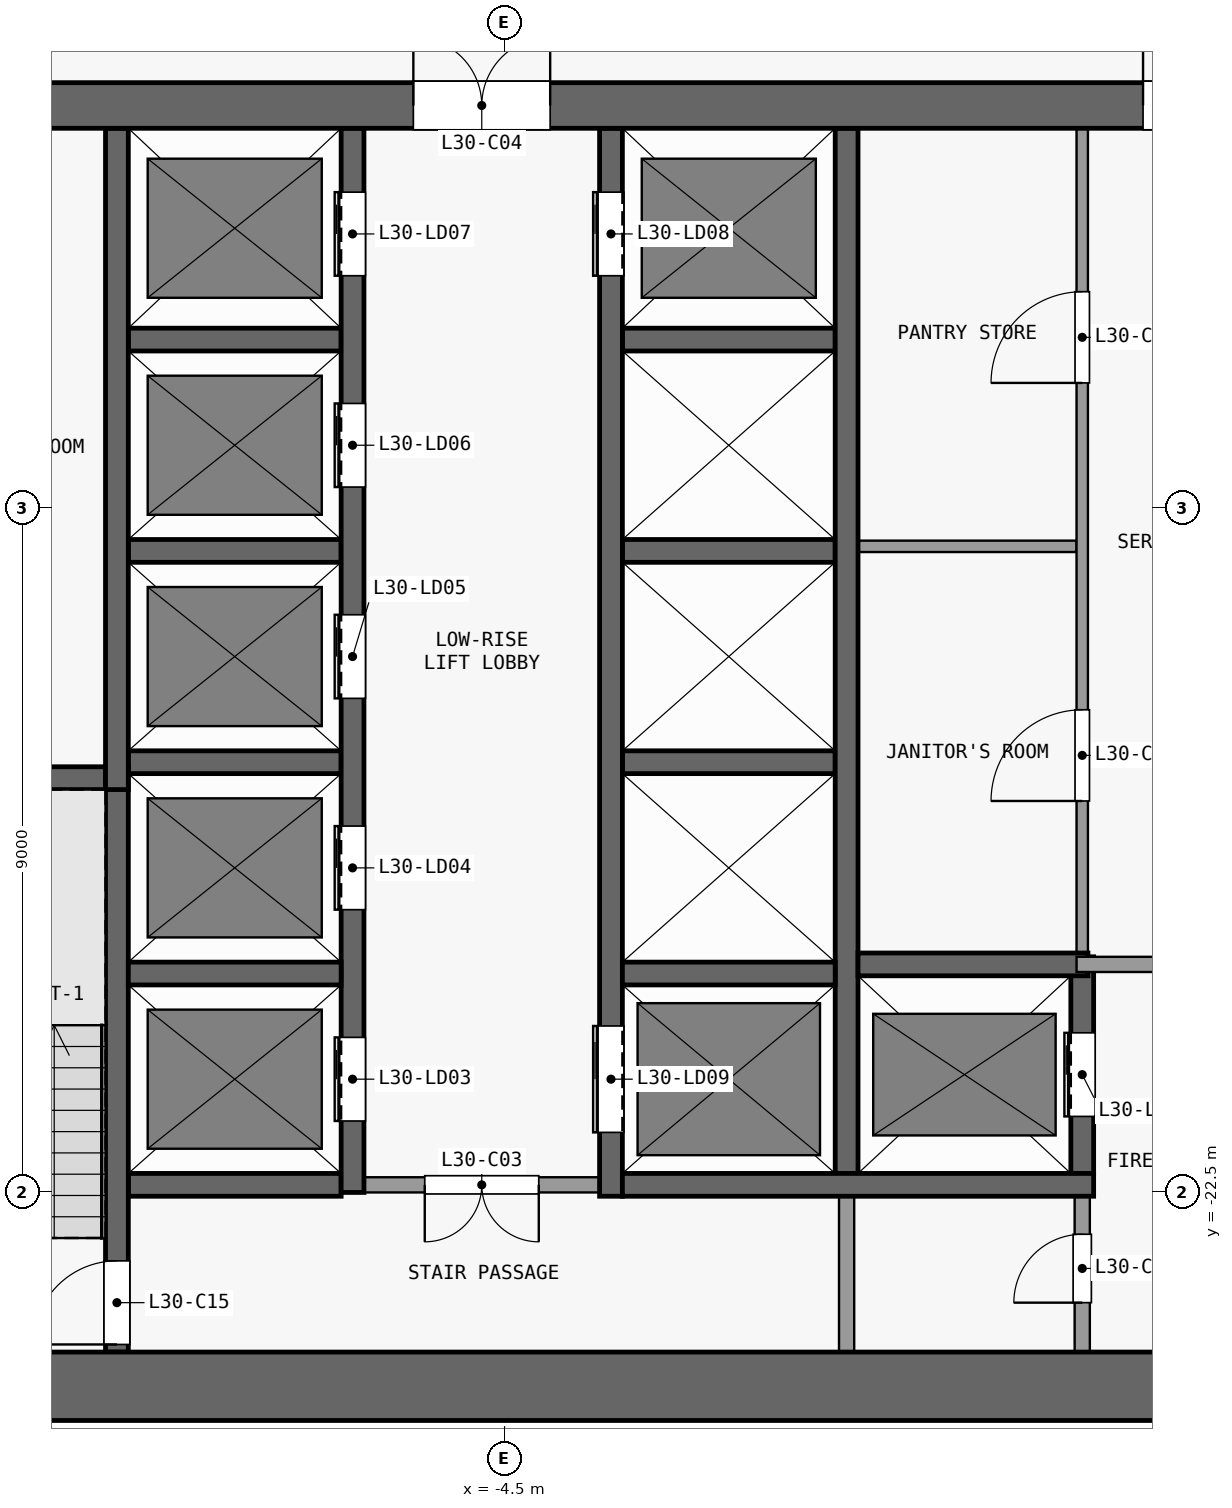
"""IFC4 building model, lengths in metres.
Left out: names, types, materials, properties, quantities, classifications, styles, units other than length and angle.
Written with IfcOpenShell. Run it as: python <this file> out.ifc"""

import sys

from ifc_helpers import new_model, si_unit, direction, frame, frame_2d, origin, place, context, subcontext, project, spatial, rectangle, extrude, element, fill, save


model = new_model("IFC4")
c1 = context("Model", 3, precision=1e-05, world=origin(), true_north=direction((0.0, 1.0)))
c2 = subcontext(c1, "Body", "Model", "MODEL_VIEW")
j1 = project(units=[si_unit("LENGTHUNIT", "METRE"), si_unit("PLANEANGLEUNIT", "RADIAN")], contexts=[c1])
p1 = place(None, origin())
s1 = spatial("IfcSite", under=j1, at=p1, CompositionType="ELEMENT")
p2 = place(p1, origin())
s2 = spatial("IfcBuilding", under=s1, at=p2, CompositionType="ELEMENT")
p3 = place(p2, frame((0.0, 0.0, 120.7)))
s3 = spatial("IfcBuildingStorey", under=s2, at=p3, CompositionType="ELEMENT", Elevation=120.7)
p4 = place(p3, frame((-13.4, -25.05, 0.0), z_axis=(0.0, 0.0, 1.0), x_axis=(1.0, 0.0, 0.0)))
e1 = element("IfcWall", 1, at=p4, inside=s3, PredefinedType="SHEAR", context=c2, shape_type="SweptSolid", body=[
    extrude(rectangle(XDim=26.8, YDim=0.9, at=frame_2d((13.4, 0.0))), origin(), (0.0, 0.0, 1.0), 3.3),
])
p5 = place(p3, frame((-13.4, -8.2, 0.0), z_axis=(0.0, 0.0, 1.0), x_axis=(1.0, 0.0, 0.0)))
e2 = element("IfcWall", 2, at=p5, inside=s3, PredefinedType="SHEAR", context=c2, shape_type="SweptSolid", body=[
    extrude(rectangle(XDim=26.8, YDim=0.6, at=frame_2d((13.4, 0.0))), origin(), (0.0, 0.0, 1.0), 3.3),
])
p6 = place(p5, frame((7.7, 0.0, 0.0)))
e3 = element("IfcOpeningElement", 3, at=p6, cuts=e2, PredefinedType="OPENING", context=c2, shape_type="SweptSolid", body=[
    extrude(rectangle(XDim=1.8, YDim=2.1, at=frame_2d((0.9, 1.05))), frame((0.0, 0.31, 0.0), z_axis=(0.0, -1.0, 0.0), x_axis=(1.0, 0.0, 0.0)), (0.0, 0.0, 1.0), 0.62),
])
p7 = place(p5, frame((17.3, 0.0, 0.0)))
e4 = element("IfcOpeningElement", 4, at=p7, cuts=e2, PredefinedType="OPENING", context=c2, shape_type="SweptSolid", body=[
    extrude(rectangle(XDim=1.8, YDim=2.1, at=frame_2d((0.9, 1.05))), frame((0.0, 0.31, 0.0), z_axis=(0.0, -1.0, 0.0), x_axis=(1.0, 0.0, 0.0)), (0.0, 0.0, 1.0), 0.62),
])
p8 = place(p5, frame((1.625, 0.0, 0.0)))
e5 = element("IfcOpeningElement", 5, at=p8, cuts=e2, PredefinedType="OPENING", context=c2, shape_type="SweptSolid", body=[
    extrude(rectangle(XDim=1.2, YDim=2.1, at=frame_2d((0.6, 1.05))), frame((0.0, 0.31, 0.0), z_axis=(0.0, -1.0, 0.0), x_axis=(1.0, 0.0, 0.0)), (0.0, 0.0, 1.0), 0.62),
])
p9 = place(p5, frame((23.275, 0.0, 0.0)))
e6 = element("IfcOpeningElement", 6, at=p9, cuts=e2, PredefinedType="OPENING", context=c2, shape_type="SweptSolid", body=[
    extrude(rectangle(XDim=0.9, YDim=2.1, at=frame_2d((0.45, 1.05))), frame((0.0, 0.31, 0.0), z_axis=(0.0, -1.0, 0.0), x_axis=(1.0, 0.0, 0.0)), (0.0, 0.0, 1.0), 0.62),
])
p10 = place(p3, frame((-9.45, -22.4, 0.0), z_axis=(0.0, 0.0, 1.0), x_axis=(1.0, 0.0, 0.0)))
e7 = element("IfcWall", 7, at=p10, inside=s3, PredefinedType="SHEAR", context=c2, shape_type="SweptSolid", body=[
    extrude(rectangle(XDim=2.8, YDim=0.3, at=frame_2d((1.4, 0.0))), origin(), (0.0, 0.0, 1.0), 3.3),
])
p11 = place(p3, frame((-3.25, -22.4, 0.0), z_axis=(0.0, 0.0, 1.0), x_axis=(-1.0, 0.0, 0.0)))
e8 = element("IfcWall", 8, at=p11, inside=s3, PredefinedType="PARTITIONING", context=c2, shape_type="SweptSolid", body=[
    extrude(rectangle(XDim=3.1, YDim=0.2, at=frame_2d((1.55, 0.0))), origin(), (0.0, 0.0, 1.0), 3.3),
])
p12 = place(p11, frame((0.8, 0.0, 0.0)))
e9 = element("IfcOpeningElement", 9, at=p12, cuts=e8, PredefinedType="OPENING", context=c2, shape_type="SweptSolid", body=[
    extrude(rectangle(XDim=1.5, YDim=2.1, at=frame_2d((0.75, 1.05))), frame((0.0, 0.11, 0.0), z_axis=(0.0, -1.0, 0.0), x_axis=(1.0, 0.0, 0.0)), (0.0, 0.0, 1.0), 0.22),
])
p13 = place(p3, frame((-2.95, -22.4, 0.0), z_axis=(0.0, 0.0, 1.0), x_axis=(1.0, 0.0, 0.0)))
e10 = element("IfcWall", 10, at=p13, inside=s3, PredefinedType="SHEAR", context=c2, shape_type="SweptSolid", body=[
    extrude(rectangle(XDim=6.2, YDim=0.3, at=frame_2d((3.1, 0.0))), origin(), (0.0, 0.0, 1.0), 3.3),
])
for number, where, z_axis, x_axis in (
    (11, (-9.45, -19.62, 0.0), (0.0, 0.0, 1.0), (1.0, 0.0, 0.0)),
    (12, (-2.95, -19.62, 0.0), (0.0, 0.0, 1.0), (1.0, 0.0, 0.0)),
):
    element("IfcWall", number, at=place(p3, frame(where, z_axis=z_axis, x_axis=x_axis)), inside=s3, PredefinedType="SHEAR", context=c2, shape_type="SweptSolid", body=[
        extrude(rectangle(XDim=2.8, YDim=0.3, at=frame_2d((1.4, 0.0))), origin(), (0.0, 0.0, 1.0), 3.3),
    ])
p14 = place(p3, frame((0.15, -19.5, 0.0), z_axis=(0.0, 0.0, 1.0), x_axis=(1.0, 0.0, 0.0)))
e13 = element("IfcWall", 13, at=p14, inside=s3, PredefinedType="SHEAR", context=c2, shape_type="SweptSolid", body=[
    extrude(rectangle(XDim=3.025, YDim=0.3, at=frame_2d((1.513, 0.0))), origin(), (0.0, 0.0, 1.0), 3.3),
])
p15 = place(p3, frame((6.575, -19.5, 0.0), z_axis=(0.0, 0.0, 1.0), x_axis=(-1.0, 0.0, 0.0)))
e14 = element("IfcWall", 14, at=p15, inside=s3, PredefinedType="PARTITIONING", context=c2, shape_type="SweptSolid", body=[
    extrude(rectangle(XDim=3.55, YDim=0.2, at=frame_2d((1.775, 0.0))), origin(), (0.0, 0.0, 1.0), 3.3),
])
p16 = place(p15, frame((1.025, 0.0, 0.0)))
e15 = element("IfcOpeningElement", 15, at=p16, cuts=e14, PredefinedType="OPENING", context=c2, shape_type="SweptSolid", body=[
    extrude(rectangle(XDim=1.5, YDim=2.1, at=frame_2d((0.75, 1.05))), frame((0.0, 0.11, 0.0), z_axis=(0.0, -1.0, 0.0), x_axis=(1.0, 0.0, 0.0)), (0.0, 0.0, 1.0), 0.22),
])
p17 = place(p3, frame((-12.6, -17.05, 0.0), z_axis=(0.0, 0.0, 1.0), x_axis=(1.0, 0.0, 0.0)))
e16 = element("IfcWall", 16, at=p17, inside=s3, PredefinedType="SHEAR", context=c2, shape_type="SweptSolid", body=[
    extrude(rectangle(XDim=2.85, YDim=0.3, at=frame_2d((1.425, 0.0))), origin(), (0.0, 0.0, 1.0), 3.3),
])
for number, where, z_axis, x_axis in (
    (17, (-9.45, -16.84, 0.0), (0.0, 0.0, 1.0), (1.0, 0.0, 0.0)),
    (18, (-2.95, -16.84, 0.0), (0.0, 0.0, 1.0), (1.0, 0.0, 0.0)),
    (19, (-9.45, -14.06, 0.0), (0.0, 0.0, 1.0), (1.0, 0.0, 0.0)),
    (20, (-2.95, -14.06, 0.0), (0.0, 0.0, 1.0), (1.0, 0.0, 0.0)),
):
    element("IfcWall", number, at=place(p3, frame(where, z_axis=z_axis, x_axis=x_axis)), inside=s3, PredefinedType="SHEAR", context=c2, shape_type="SweptSolid", body=[
        extrude(rectangle(XDim=2.8, YDim=0.3, at=frame_2d((1.4, 0.0))), origin(), (0.0, 0.0, 1.0), 3.3),
    ])
p18 = place(p3, frame((0.15, -14.0, 0.0), z_axis=(0.0, 0.0, 1.0), x_axis=(1.0, 0.0, 0.0)))
e21 = element("IfcWall", 21, at=p18, inside=s3, PredefinedType="PARTITIONING", context=c2, shape_type="SweptSolid", body=[
    extrude(rectangle(XDim=2.875, YDim=0.15, at=frame_2d((1.438, 0.0))), origin(), (0.0, 0.0, 1.0), 3.3),
])
for number, where, z_axis, x_axis in (
    (22, (-9.45, -11.28, 0.0), (0.0, 0.0, 1.0), (1.0, 0.0, 0.0)),
    (23, (-2.95, -11.28, 0.0), (0.0, 0.0, 1.0), (1.0, 0.0, 0.0)),
):
    element("IfcWall", number, at=place(p3, frame(where, z_axis=z_axis, x_axis=x_axis)), inside=s3, PredefinedType="SHEAR", context=c2, shape_type="SweptSolid", body=[
        extrude(rectangle(XDim=2.8, YDim=0.3, at=frame_2d((1.4, 0.0))), origin(), (0.0, 0.0, 1.0), 3.3),
    ])
p19 = place(p3, frame((-9.6, -24.6, 0.0), z_axis=(0.0, 0.0, 1.0), x_axis=(0.0, 1.0, 0.0)))
e24 = element("IfcWall", 24, at=p19, inside=s3, PredefinedType="SHEAR", context=c2, shape_type="SweptSolid", body=[
    extrude(rectangle(XDim=7.7, YDim=0.3, at=frame_2d((3.85, 0.0))), origin(), (0.0, 0.0, 1.0), 3.3),
])
p20 = place(p19, frame((0.1, 0.0, 0.0)))
e25 = element("IfcOpeningElement", 25, at=p20, cuts=e24, PredefinedType="OPENING", context=c2, shape_type="SweptSolid", body=[
    extrude(rectangle(XDim=1.1, YDim=2.1, at=frame_2d((0.55, 1.05))), frame((0.0, 0.16, 0.0), z_axis=(0.0, -1.0, 0.0), x_axis=(1.0, 0.0, 0.0)), (0.0, 0.0, 1.0), 0.32),
])
p21 = place(p3, frame((-9.6, -17.2, 0.0), z_axis=(0.0, 0.0, 1.0), x_axis=(0.0, 1.0, 0.0)))
e26 = element("IfcWall", 26, at=p21, inside=s3, PredefinedType="SHEAR", context=c2, shape_type="SweptSolid", body=[
    extrude(rectangle(XDim=8.7, YDim=0.3, at=frame_2d((4.35, 0.0))), origin(), (0.0, 0.0, 1.0), 3.3),
])
p22 = place(p3, frame((-6.5, -22.5, 0.0), z_axis=(0.0, 0.0, 1.0), x_axis=(0.0, 1.0, 0.0)))
e27 = element("IfcWall", 27, at=p22, inside=s3, PredefinedType="SHEAR", context=c2, shape_type="SweptSolid", body=[
    extrude(rectangle(XDim=14.0, YDim=0.3, at=frame_2d((7.0, 0.0))), origin(), (0.0, 0.0, 1.0), 3.3),
])
p23 = place(p22, frame((0.94, 0.0, 0.0)))
e28 = element("IfcOpeningElement", 28, at=p23, cuts=e27, PredefinedType="OPENING", context=c2, shape_type="SweptSolid", body=[
    extrude(rectangle(XDim=1.1, YDim=2.1, at=frame_2d((0.55, 1.05))), frame((0.0, 0.16, 0.0), z_axis=(0.0, -1.0, 0.0), x_axis=(1.0, 0.0, 0.0)), (0.0, 0.0, 1.0), 0.32),
])
p24 = place(p22, frame((3.72, 0.0, 0.0)))
e29 = element("IfcOpeningElement", 29, at=p24, cuts=e27, PredefinedType="OPENING", context=c2, shape_type="SweptSolid", body=[
    extrude(rectangle(XDim=1.1, YDim=2.1, at=frame_2d((0.55, 1.05))), frame((0.0, 0.16, 0.0), z_axis=(0.0, -1.0, 0.0), x_axis=(1.0, 0.0, 0.0)), (0.0, 0.0, 1.0), 0.32),
])
p25 = place(p22, frame((6.5, 0.0, 0.0)))
e30 = element("IfcOpeningElement", 30, at=p25, cuts=e27, PredefinedType="OPENING", context=c2, shape_type="SweptSolid", body=[
    extrude(rectangle(XDim=1.1, YDim=2.1, at=frame_2d((0.55, 1.05))), frame((0.0, 0.16, 0.0), z_axis=(0.0, -1.0, 0.0), x_axis=(1.0, 0.0, 0.0)), (0.0, 0.0, 1.0), 0.32),
])
p26 = place(p22, frame((9.28, 0.0, 0.0)))
e31 = element("IfcOpeningElement", 31, at=p26, cuts=e27, PredefinedType="OPENING", context=c2, shape_type="SweptSolid", body=[
    extrude(rectangle(XDim=1.1, YDim=2.1, at=frame_2d((0.55, 1.05))), frame((0.0, 0.16, 0.0), z_axis=(0.0, -1.0, 0.0), x_axis=(1.0, 0.0, 0.0)), (0.0, 0.0, 1.0), 0.32),
])
p27 = place(p22, frame((12.06, 0.0, 0.0)))
e32 = element("IfcOpeningElement", 32, at=p27, cuts=e27, PredefinedType="OPENING", context=c2, shape_type="SweptSolid", body=[
    extrude(rectangle(XDim=1.1, YDim=2.1, at=frame_2d((0.55, 1.05))), frame((0.0, 0.16, 0.0), z_axis=(0.0, -1.0, 0.0), x_axis=(1.0, 0.0, 0.0)), (0.0, 0.0, 1.0), 0.32),
])
p28 = place(p3, frame((-3.1, -22.55, 0.0), z_axis=(0.0, 0.0, 1.0), x_axis=(0.0, 1.0, 0.0)))
e33 = element("IfcWall", 33, at=p28, inside=s3, PredefinedType="SHEAR", context=c2, shape_type="SweptSolid", body=[
    extrude(rectangle(XDim=14.05, YDim=0.3, at=frame_2d((7.025, 0.0))), origin(), (0.0, 0.0, 1.0), 3.3),
])
p29 = place(p28, frame((12.11, 0.0, 0.0)))
e34 = element("IfcOpeningElement", 34, at=p29, cuts=e33, PredefinedType="OPENING", context=c2, shape_type="SweptSolid", body=[
    extrude(rectangle(XDim=1.1, YDim=2.1, at=frame_2d((0.55, 1.05))), frame((0.0, 0.16, 0.0), z_axis=(0.0, -1.0, 0.0), x_axis=(1.0, 0.0, 0.0)), (0.0, 0.0, 1.0), 0.32),
])
p30 = place(p28, frame((0.84, 0.0, 0.0)))
e35 = element("IfcOpeningElement", 35, at=p30, cuts=e33, PredefinedType="OPENING", context=c2, shape_type="SweptSolid", body=[
    extrude(rectangle(XDim=1.4, YDim=2.1, at=frame_2d((0.7, 1.05))), frame((0.0, 0.16, 0.0), z_axis=(0.0, -1.0, 0.0), x_axis=(1.0, 0.0, 0.0)), (0.0, 0.0, 1.0), 0.32),
])
p31 = place(p3, frame((0.0, -24.6, 0.0), z_axis=(0.0, 0.0, 1.0), x_axis=(0.0, 1.0, 0.0)))
e36 = element("IfcWall", 36, at=p31, inside=s3, PredefinedType="PARTITIONING", context=c2, shape_type="SweptSolid", body=[
    extrude(rectangle(XDim=2.05, YDim=0.2, at=frame_2d((1.025, 0.0))), origin(), (0.0, 0.0, 1.0), 3.3),
])
p32 = place(p3, frame((0.0, -22.25, 0.0), z_axis=(0.0, 0.0, 1.0), x_axis=(0.0, 1.0, 0.0)))
e37 = element("IfcWall", 37, at=p32, inside=s3, PredefinedType="SHEAR", context=c2, shape_type="SweptSolid", body=[
    extrude(rectangle(XDim=13.75, YDim=0.3, at=frame_2d((6.875, 0.0))), origin(), (0.0, 0.0, 1.0), 3.3),
])
p33 = place(p3, frame((3.1, -24.6, 0.0), z_axis=(0.0, 0.0, 1.0), x_axis=(0.0, 1.0, 0.0)))
e38 = element("IfcWall", 38, at=p33, inside=s3, PredefinedType="PARTITIONING", context=c2, shape_type="SweptSolid", body=[
    extrude(rectangle(XDim=2.05, YDim=0.2, at=frame_2d((1.025, 0.0))), origin(), (0.0, 0.0, 1.0), 3.3),
])
p34 = place(p33, frame((0.65, 0.0, 0.0)))
e39 = element("IfcOpeningElement", 39, at=p34, cuts=e38, PredefinedType="OPENING", context=c2, shape_type="SweptSolid", body=[
    extrude(rectangle(XDim=0.9, YDim=2.1, at=frame_2d((0.45, 1.05))), frame((0.0, 0.11, 0.0), z_axis=(0.0, -1.0, 0.0), x_axis=(1.0, 0.0, 0.0)), (0.0, 0.0, 1.0), 0.22),
])
p35 = place(p3, frame((3.1, -22.25, 0.0), z_axis=(0.0, 0.0, 1.0), x_axis=(0.0, 1.0, 0.0)))
e40 = element("IfcWall", 40, at=p35, inside=s3, PredefinedType="SHEAR", context=c2, shape_type="SweptSolid", body=[
    extrude(rectangle(XDim=2.85, YDim=0.3, at=frame_2d((1.425, 0.0))), origin(), (0.0, 0.0, 1.0), 3.3),
])
p36 = place(p35, frame((0.75, 0.0, 0.0)))
e41 = element("IfcOpeningElement", 41, at=p36, cuts=e40, PredefinedType="OPENING", context=c2, shape_type="SweptSolid", body=[
    extrude(rectangle(XDim=1.1, YDim=2.1, at=frame_2d((0.55, 1.05))), frame((0.0, 0.16, 0.0), z_axis=(0.0, -1.0, 0.0), x_axis=(1.0, 0.0, 0.0)), (0.0, 0.0, 1.0), 0.32),
])
p37 = place(p3, frame((3.1, -19.4, 0.0), z_axis=(0.0, 0.0, 1.0), x_axis=(0.0, 1.0, 0.0)))
e42 = element("IfcWall", 42, at=p37, inside=s3, PredefinedType="PARTITIONING", context=c2, shape_type="SweptSolid", body=[
    extrude(rectangle(XDim=10.9, YDim=0.15, at=frame_2d((5.45, 0.0))), origin(), (0.0, 0.0, 1.0), 3.3),
])
p38 = place(p37, frame((2.05, 0.0, 0.0)))
e43 = element("IfcOpeningElement", 43, at=p38, cuts=e42, PredefinedType="OPENING", context=c2, shape_type="SweptSolid", body=[
    extrude(rectangle(XDim=1.2, YDim=2.1, at=frame_2d((0.6, 1.05))), frame((0.0, 0.085, 0.0), z_axis=(0.0, -1.0, 0.0), x_axis=(1.0, 0.0, 0.0)), (0.0, 0.0, 1.0), 0.17),
])
p39 = place(p37, frame((7.55, 0.0, 0.0)))
e44 = element("IfcOpeningElement", 44, at=p39, cuts=e42, PredefinedType="OPENING", context=c2, shape_type="SweptSolid", body=[
    extrude(rectangle(XDim=1.2, YDim=2.1, at=frame_2d((0.6, 1.05))), frame((0.0, 0.085, 0.0), z_axis=(0.0, -1.0, 0.0), x_axis=(1.0, 0.0, 0.0)), (0.0, 0.0, 1.0), 0.17),
])
p40 = place(p36, origin())
e45 = element("IfcDoor", 45, at=p40, inside=s3, OperationType="DOUBLE_DOOR_SLIDING", PredefinedType="DOOR", context=c2, shape_type="SweptSolid", body=[
    extrude(rectangle(XDim=1.1, YDim=2.1, at=frame_2d((0.55, 1.05))), frame((0.0, 0.025, 0.0), z_axis=(0.0, -1.0, 0.0), x_axis=(1.0, 0.0, 0.0)), (0.0, 0.0, 1.0), 0.05),
])
fill(e41, e45)
p41 = place(p23, origin())
e46 = element("IfcDoor", 46, at=p41, inside=s3, OperationType="DOUBLE_DOOR_SLIDING", PredefinedType="DOOR", context=c2, shape_type="SweptSolid", body=[
    extrude(rectangle(XDim=1.1, YDim=2.1, at=frame_2d((0.55, 1.05))), frame((0.0, 0.025, 0.0), z_axis=(0.0, -1.0, 0.0), x_axis=(1.0, 0.0, 0.0)), (0.0, 0.0, 1.0), 0.05),
])
fill(e28, e46)
p42 = place(p24, origin())
e47 = element("IfcDoor", 47, at=p42, inside=s3, OperationType="DOUBLE_DOOR_SLIDING", PredefinedType="DOOR", context=c2, shape_type="SweptSolid", body=[
    extrude(rectangle(XDim=1.1, YDim=2.1, at=frame_2d((0.55, 1.05))), frame((0.0, 0.025, 0.0), z_axis=(0.0, -1.0, 0.0), x_axis=(1.0, 0.0, 0.0)), (0.0, 0.0, 1.0), 0.05),
])
fill(e29, e47)
p43 = place(p25, origin())
e48 = element("IfcDoor", 48, at=p43, inside=s3, OperationType="DOUBLE_DOOR_SLIDING", PredefinedType="DOOR", context=c2, shape_type="SweptSolid", body=[
    extrude(rectangle(XDim=1.1, YDim=2.1, at=frame_2d((0.55, 1.05))), frame((0.0, 0.025, 0.0), z_axis=(0.0, -1.0, 0.0), x_axis=(1.0, 0.0, 0.0)), (0.0, 0.0, 1.0), 0.05),
])
fill(e30, e48)
p44 = place(p26, origin())
e49 = element("IfcDoor", 49, at=p44, inside=s3, OperationType="DOUBLE_DOOR_SLIDING", PredefinedType="DOOR", context=c2, shape_type="SweptSolid", body=[
    extrude(rectangle(XDim=1.1, YDim=2.1, at=frame_2d((0.55, 1.05))), frame((0.0, 0.025, 0.0), z_axis=(0.0, -1.0, 0.0), x_axis=(1.0, 0.0, 0.0)), (0.0, 0.0, 1.0), 0.05),
])
fill(e31, e49)
p45 = place(p27, origin())
e50 = element("IfcDoor", 50, at=p45, inside=s3, OperationType="DOUBLE_DOOR_SLIDING", PredefinedType="DOOR", context=c2, shape_type="SweptSolid", body=[
    extrude(rectangle(XDim=1.1, YDim=2.1, at=frame_2d((0.55, 1.05))), frame((0.0, 0.025, 0.0), z_axis=(0.0, -1.0, 0.0), x_axis=(1.0, 0.0, 0.0)), (0.0, 0.0, 1.0), 0.05),
])
fill(e32, e50)
p46 = place(p29, origin())
e51 = element("IfcDoor", 51, at=p46, inside=s3, OperationType="DOUBLE_DOOR_SLIDING", PredefinedType="DOOR", context=c2, shape_type="SweptSolid", body=[
    extrude(rectangle(XDim=1.1, YDim=2.1, at=frame_2d((0.55, 1.05))), frame((0.0, 0.025, 0.0), z_axis=(0.0, -1.0, 0.0), x_axis=(1.0, 0.0, 0.0)), (0.0, 0.0, 1.0), 0.05),
])
fill(e34, e51)
p47 = place(p30, origin())
e52 = element("IfcDoor", 52, at=p47, inside=s3, OperationType="DOUBLE_DOOR_SLIDING", PredefinedType="DOOR", context=c2, shape_type="SweptSolid", body=[
    extrude(rectangle(XDim=1.4, YDim=2.1, at=frame_2d((0.7, 1.05))), frame((0.0, 0.025, 0.0), z_axis=(0.0, -1.0, 0.0), x_axis=(1.0, 0.0, 0.0)), (0.0, 0.0, 1.0), 0.05),
])
fill(e35, e52)
p48 = place(p12, origin())
e53 = element("IfcDoor", 53, at=p48, inside=s3, OperationType="DOUBLE_DOOR_SINGLE_SWING", PredefinedType="DOOR", context=c2, shape_type="SweptSolid", body=[
    extrude(rectangle(XDim=1.5, YDim=2.1, at=frame_2d((0.75, 1.05))), frame((0.0, 0.025, 0.0), z_axis=(0.0, -1.0, 0.0), x_axis=(1.0, 0.0, 0.0)), (0.0, 0.0, 1.0), 0.05),
])
fill(e9, e53)
p49 = place(p6, origin())
e54 = element("IfcDoor", 54, at=p49, inside=s3, OperationType="DOUBLE_DOOR_SINGLE_SWING", PredefinedType="DOOR", context=c2, shape_type="SweptSolid", body=[
    extrude(rectangle(XDim=1.8, YDim=2.1, at=frame_2d((0.9, 1.05))), frame((0.0, 0.025, 0.0), z_axis=(0.0, -1.0, 0.0), x_axis=(1.0, 0.0, 0.0)), (0.0, 0.0, 1.0), 0.05),
])
fill(e3, e54)
p50 = place(p7, origin())
e55 = element("IfcDoor", 55, at=p50, inside=s3, OperationType="DOUBLE_DOOR_SINGLE_SWING", PredefinedType="DOOR", context=c2, shape_type="SweptSolid", body=[
    extrude(rectangle(XDim=1.8, YDim=2.1, at=frame_2d((0.9, 1.05))), frame((0.0, 0.025, 0.0), z_axis=(0.0, -1.0, 0.0), x_axis=(1.0, 0.0, 0.0)), (0.0, 0.0, 1.0), 0.05),
])
fill(e4, e55)
p51 = place(p34, origin())
e56 = element("IfcDoor", 56, at=p51, inside=s3, OperationType="SINGLE_SWING_LEFT", PredefinedType="DOOR", context=c2, shape_type="SweptSolid", body=[
    extrude(rectangle(XDim=0.9, YDim=2.1, at=frame_2d((0.45, 1.05))), frame((0.0, 0.025, 0.0), z_axis=(0.0, -1.0, 0.0), x_axis=(1.0, 0.0, 0.0)), (0.0, 0.0, 1.0), 0.05),
])
fill(e39, e56)
p52 = place(p38, origin())
e57 = element("IfcDoor", 57, at=p52, inside=s3, OperationType="SINGLE_SWING_LEFT", PredefinedType="DOOR", context=c2, shape_type="SweptSolid", body=[
    extrude(rectangle(XDim=1.2, YDim=2.1, at=frame_2d((0.6, 1.05))), frame((0.0, 0.025, 0.0), z_axis=(0.0, -1.0, 0.0), x_axis=(1.0, 0.0, 0.0)), (0.0, 0.0, 1.0), 0.05),
])
fill(e43, e57)
p53 = place(p39, origin())
e58 = element("IfcDoor", 58, at=p53, inside=s3, OperationType="SINGLE_SWING_LEFT", PredefinedType="DOOR", context=c2, shape_type="SweptSolid", body=[
    extrude(rectangle(XDim=1.2, YDim=2.1, at=frame_2d((0.6, 1.05))), frame((0.0, 0.025, 0.0), z_axis=(0.0, -1.0, 0.0), x_axis=(1.0, 0.0, 0.0)), (0.0, 0.0, 1.0), 0.05),
])
fill(e44, e58)
p54 = place(p20, origin())
e59 = element("IfcDoor", 59, at=p54, inside=s3, OperationType="SINGLE_SWING_LEFT", PredefinedType="DOOR", context=c2, shape_type="SweptSolid", body=[
    extrude(rectangle(XDim=1.1, YDim=2.1, at=frame_2d((0.55, 1.05))), frame((0.0, 0.025, 0.0), z_axis=(0.0, -1.0, 0.0), x_axis=(1.0, 0.0, 0.0)), (0.0, 0.0, 1.0), 0.05),
])
fill(e25, e59)
save(model, sys.argv[1])
